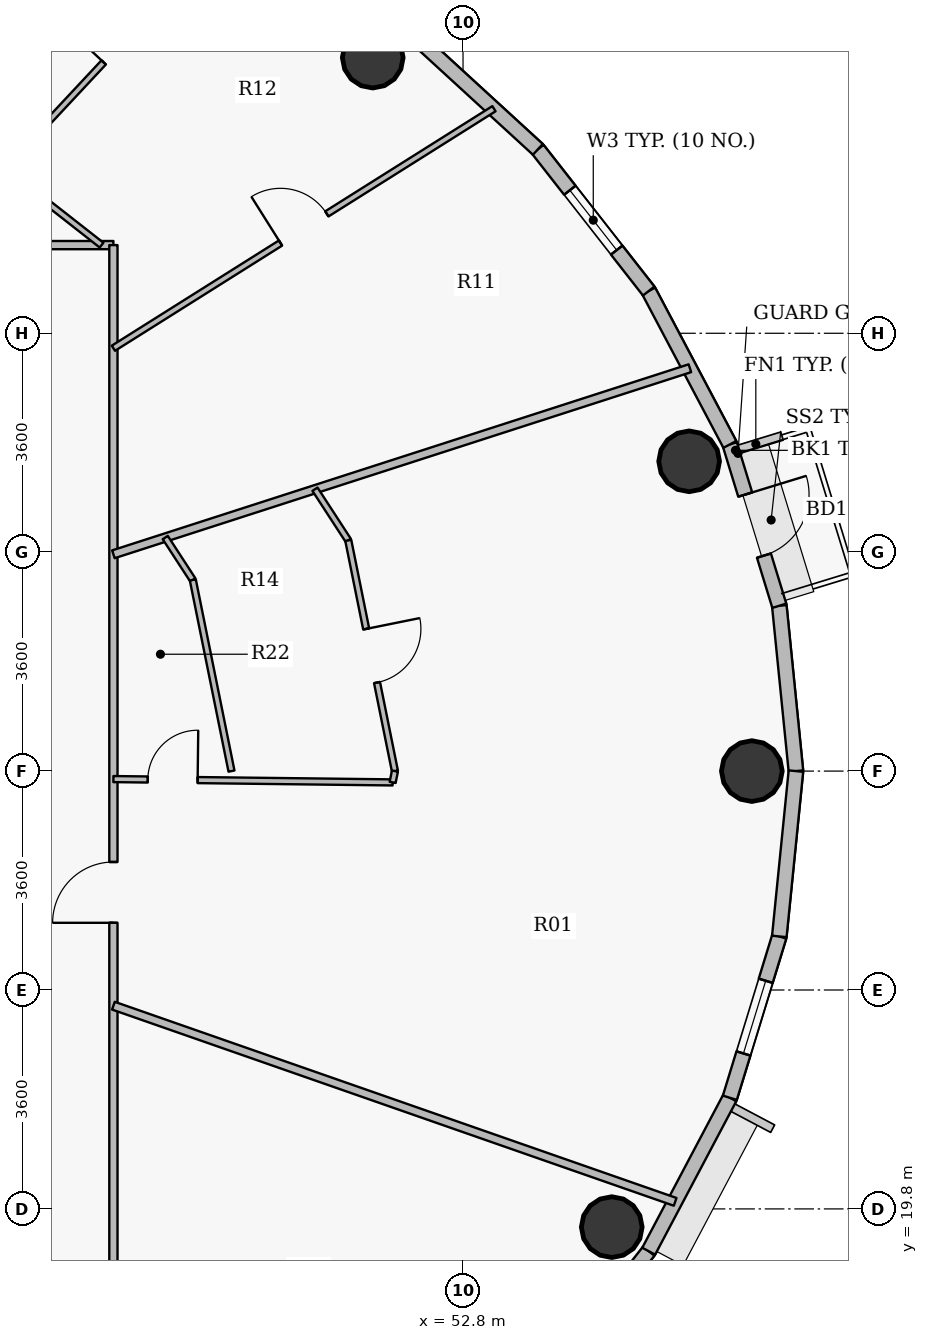
"""IFC4 building model, lengths in metres.
Left out: names, types, materials, properties, quantities, classifications, styles, units other than length and angle.
Written with IfcOpenShell. Run it as: python <this file> out.ifc"""

import sys

from ifc_helpers import new_model, si_unit, direction, frame, frame_2d, origin, origin_2d, place, context, subcontext, project, spatial, rectangle, hollow_circle, extrude, source, transform, mapped, element, fill, save


model = new_model("IFC4")
c1 = context("Model", 3, precision=1e-05, world=origin(), true_north=direction((0.0, 1.0)))
c2 = subcontext(c1, "Body", "Model", "MODEL_VIEW")
j1 = project(units=[si_unit("LENGTHUNIT", "METRE"), si_unit("PLANEANGLEUNIT", "RADIAN")], contexts=[c1])
p1 = place(None, origin())
s1 = spatial("IfcSite", under=j1, at=p1, CompositionType="ELEMENT")
p2 = place(p1, origin())
s2 = spatial("IfcBuilding", under=s1, at=p2, CompositionType="ELEMENT")
p3 = place(p2, frame((0.0, 0.0, 303.0)))
s3 = spatial("IfcBuildingStorey", under=s2, at=p3, CompositionType="ELEMENT", Elevation=303.0)
for number, where, z_axis, x_axis in (
    (1, (57.55, 27.0, 0.0), (0.0, 0.0, 1.0), (1.0, 0.0, 0.0)),
    (2, (56.519, 32.094, 0.0), (0.0, 0.0, 1.0), (1.0, 0.0, 0.0)),
    (3, (51.315, 38.733, 0.0), (0.0, 0.0, 1.0), (1.0, 0.0, 0.0)),
    (4, (55.246, 19.5, 0.0), (0.0, 0.0, 1.0), (1.0, 0.0, 0.0)),
):
    element("IfcColumn", number, at=place(p3, frame(where, z_axis=z_axis, x_axis=x_axis)), inside=s3, PredefinedType="COLUMN", context=c2, shape_type="SweptSolid", body=[
        extrude(hollow_circle(Radius=0.5, WallThickness=0.032, at=origin_2d()), origin(), (0.0, 0.0, 1.0), 3.75),
    ])
p4 = place(p3, frame((58.002, 29.719, 0.0), z_axis=(0.0, 0.0, 1.0), x_axis=(0.099972526841, -0.99499019788, 0.0)))
e5 = element("IfcWall", 5, at=p4, inside=s3, PredefinedType="SOLIDWALL", context=c2, shape_type="SweptSolid", body=[
    extrude(rectangle(XDim=2.733, YDim=0.24, at=frame_2d((1.366, 0.0))), origin(), (0.0, 0.0, 1.0), 3.5),
])
p5 = place(p3, frame((57.188, 32.372, 0.0), z_axis=(0.0, 0.0, 1.0), x_axis=(0.2931213403, -0.956075248012, 0.0)))
e6 = element("IfcWall", 6, at=p5, inside=s3, PredefinedType="SOLIDWALL", context=c2, shape_type="SweptSolid", body=[
    extrude(rectangle(XDim=2.775, YDim=0.24, at=frame_2d((1.388, 0.0))), origin(), (0.0, 0.0, 1.0), 3.5),
])
p6 = place(p5, frame((0.863, 0.0, 0.0)))
e7 = element("IfcOpeningElement", 7, at=p6, cuts=e6, PredefinedType="OPENING", context=c2, shape_type="SweptSolid", body=[
    extrude(rectangle(XDim=1.05, YDim=2.15, at=origin_2d()), frame((0.525, 0.13, 1.075), z_axis=(0.0, -1.0, 0.0), x_axis=(1.0, 0.0, 0.0)), (0.0, 0.0, 1.0), 0.26),
])
p7 = place(p3, frame((55.854, 34.895, 0.0), z_axis=(0.0, 0.0, 1.0), x_axis=(0.467628269026, -0.883925224218, 0.0)))
e8 = element("IfcWall", 8, at=p7, inside=s3, PredefinedType="SOLIDWALL", context=c2, shape_type="SweptSolid", body=[
    extrude(rectangle(XDim=2.854, YDim=0.24, at=frame_2d((1.427, 0.0))), origin(), (0.0, 0.0, 1.0), 3.5),
])
p8 = place(p3, frame((54.03, 37.225, 0.0), z_axis=(0.0, 0.0, 1.0), x_axis=(0.616337186556, -0.787482363275, 0.0)))
e9 = element("IfcWall", 9, at=p8, inside=s3, PredefinedType="SOLIDWALL", context=c2, shape_type="SweptSolid", body=[
    extrude(rectangle(XDim=2.958, YDim=0.24, at=frame_2d((1.479, 0.0))), origin(), (0.0, 0.0, 1.0), 3.5),
])
p9 = place(p8, frame((0.854, 0.0, 0.9)))
e10 = element("IfcOpeningElement", 10, at=p9, cuts=e9, PredefinedType="OPENING", context=c2, shape_type="SweptSolid", body=[
    extrude(rectangle(XDim=1.25, YDim=1.65, at=origin_2d()), frame((0.625, 0.13, 0.825), z_axis=(0.0, -1.0, 0.0), x_axis=(1.0, 0.0, 0.0)), (0.0, 0.0, 1.0), 0.26),
])
p10 = place(p3, frame((51.762, 39.304, 0.0), z_axis=(0.0, 0.0, 1.0), x_axis=(0.737068506972, -0.675818034703, 0.0)))
e11 = element("IfcWall", 11, at=p10, inside=s3, PredefinedType="SOLIDWALL", context=c2, shape_type="SweptSolid", body=[
    extrude(rectangle(XDim=3.077, YDim=0.24, at=frame_2d((1.539, 0.0))), origin(), (0.0, 0.0, 1.0), 3.5),
])
p11 = place(p3, frame((55.854, 19.105, 0.0), z_axis=(0.0, 0.0, 1.0), x_axis=(-0.616337186556, -0.787482363275, 0.0)))
e12 = element("IfcWall", 12, at=p11, inside=s3, PredefinedType="SOLIDWALL", context=c2, shape_type="SweptSolid", body=[
    extrude(rectangle(XDim=2.958, YDim=0.24, at=frame_2d((1.479, 0.0))), origin(), (0.0, 0.0, 1.0), 3.5),
])
p12 = place(p11, frame((0.854, 0.0, 0.9)))
e13 = element("IfcOpeningElement", 13, at=p12, cuts=e12, PredefinedType="OPENING", context=c2, shape_type="SweptSolid", body=[
    extrude(rectangle(XDim=1.25, YDim=1.65, at=origin_2d()), frame((0.625, 0.13, 0.825), z_axis=(0.0, -1.0, 0.0), x_axis=(1.0, 0.0, 0.0)), (0.0, 0.0, 1.0), 0.26),
])
p13 = place(p3, frame((57.188, 21.628, 0.0), z_axis=(0.0, 0.0, 1.0), x_axis=(-0.467628269026, -0.883925224218, 0.0)))
e14 = element("IfcWall", 14, at=p13, inside=s3, PredefinedType="SOLIDWALL", context=c2, shape_type="SweptSolid", body=[
    extrude(rectangle(XDim=2.854, YDim=0.24, at=frame_2d((1.427, 0.0))), origin(), (0.0, 0.0, 1.0), 3.5),
])
p14 = place(p3, frame((58.002, 24.281, 0.0), z_axis=(0.0, 0.0, 1.0), x_axis=(-0.2931213403, -0.956075248012, 0.0)))
e15 = element("IfcWall", 15, at=p14, inside=s3, PredefinedType="SOLIDWALL", context=c2, shape_type="SweptSolid", body=[
    extrude(rectangle(XDim=2.775, YDim=0.24, at=frame_2d((1.388, 0.0))), origin(), (0.0, 0.0, 1.0), 3.5),
])
p15 = place(p14, frame((0.763, 0.0, 0.9)))
e16 = element("IfcOpeningElement", 16, at=p15, cuts=e15, PredefinedType="OPENING", context=c2, shape_type="SweptSolid", body=[
    extrude(rectangle(XDim=1.25, YDim=1.65, at=origin_2d()), frame((0.625, 0.13, 0.825), z_axis=(0.0, -1.0, 0.0), x_axis=(1.0, 0.0, 0.0)), (0.0, 0.0, 1.0), 0.26),
])
p16 = place(p3, frame((58.275, 27.0, 0.0), z_axis=(0.0, 0.0, 1.0), x_axis=(-0.099972526841, -0.99499019788, 0.0)))
e17 = element("IfcWall", 17, at=p16, inside=s3, PredefinedType="SOLIDWALL", context=c2, shape_type="SweptSolid", body=[
    extrude(rectangle(XDim=2.733, YDim=0.24, at=frame_2d((1.366, 0.0))), origin(), (0.0, 0.0, 1.0), 3.5),
])
p17 = place(p3, frame((36.95, 35.65, 0.0), z_axis=(0.0, 0.0, 1.0), x_axis=(1.0, 0.0, 0.0)))
e18 = element("IfcWall", 18, at=p17, inside=s3, PredefinedType="PARTITIONING", context=c2, shape_type="SweptSolid", body=[
    extrude(rectangle(XDim=10.1, YDim=0.135, at=frame_2d((5.05, 0.0))), origin(), (0.0, 0.0, 1.0), 3.035),
])
p18 = place(p17, frame((6.477, 0.0, 0.0)))
e19 = element("IfcOpeningElement", 19, at=p18, cuts=e18, PredefinedType="OPENING", context=c2, shape_type="SweptSolid", body=[
    extrude(rectangle(XDim=1.0, YDim=2.15, at=origin_2d()), frame((0.5, 0.078, 1.075), z_axis=(0.0, -1.0, 0.0), x_axis=(1.0, 0.0, 0.0)), (0.0, 0.0, 1.0), 0.155),
])
p19 = place(p3, frame((45.254, 36.904, 0.0), z_axis=(0.0, 0.0, 1.0), x_axis=(0.787350433025, -0.616505714179, 0.0)))
e20 = element("IfcWall", 20, at=p19, inside=s3, PredefinedType="PARTITIONING", context=c2, shape_type="SweptSolid", body=[
    extrude(rectangle(XDim=2.033, YDim=0.1, at=frame_2d((1.017, 0.0))), origin(), (0.0, 0.0, 1.0), 3.5),
])
p20 = place(p3, frame((45.254, 36.904, 0.0), z_axis=(0.0, 0.0, 1.0), x_axis=(0.682727638106, 0.73067295842, 0.0)))
e21 = element("IfcWall", 21, at=p20, inside=s3, PredefinedType="PARTITIONING", context=c2, shape_type="SweptSolid", body=[
    extrude(rectangle(XDim=5.693, YDim=0.1, at=frame_2d((2.846, 0.0))), origin(), (0.0, 0.0, 1.0), 2.985),
])
p21 = place(p20, frame((2.396, 0.0, 0.0)))
e22 = element("IfcOpeningElement", 22, at=p21, cuts=e21, PredefinedType="OPENING", context=c2, shape_type="SweptSolid", body=[
    extrude(rectangle(XDim=0.9, YDim=2.1, at=origin_2d()), frame((0.45, 0.06, 1.05), z_axis=(0.0, -1.0, 0.0), x_axis=(1.0, 0.0, 0.0)), (0.0, 0.0, 1.0), 0.12),
])
p22 = place(p3, frame((47.05, 18.35, 0.0), z_axis=(0.0, 0.0, 1.0), x_axis=(0.0, 1.0, 0.0)))
e23 = element("IfcWall", 23, at=p22, inside=s3, PredefinedType="PARTITIONING", context=c2, shape_type="SweptSolid", body=[
    extrude(rectangle(XDim=17.3, YDim=0.135, at=frame_2d((8.65, 0.0))), origin(), (0.0, 0.0, 1.0), 3.035),
])
p23 = place(p22, frame((6.155, 0.0, 0.0)))
e24 = element("IfcOpeningElement", 24, at=p23, cuts=e23, PredefinedType="OPENING", context=c2, shape_type="SweptSolid", body=[
    extrude(rectangle(XDim=1.0, YDim=2.15, at=origin_2d()), frame((0.5, 0.078, 1.075), z_axis=(0.0, -1.0, 0.0), x_axis=(1.0, 0.0, 0.0)), (0.0, 0.0, 1.0), 0.155),
])
p24 = place(p3, frame((47.05, 23.142, 0.0), z_axis=(0.0, 0.0, 1.0), x_axis=(0.94410974345, -0.329631297547, 0.0)))
e25 = element("IfcWall", 25, at=p24, inside=s3, PredefinedType="PARTITIONING", context=c2, shape_type="SweptSolid", body=[
    extrude(rectangle(XDim=9.785, YDim=0.135, at=frame_2d((4.893, 0.0))), origin(), (0.0, 0.0, 1.0), 2.985),
])
p25 = place(p3, frame((47.05, 26.869, 0.0), z_axis=(0.0, 0.0, 1.0), x_axis=(0.999929100649, -0.011907714968, 0.0)))
e26 = element("IfcWall", 26, at=p25, inside=s3, PredefinedType="PARTITIONING", context=c2, shape_type="SweptSolid", body=[
    extrude(rectangle(XDim=4.593, YDim=0.1, at=frame_2d((2.296, 0.0))), origin(), (0.0, 0.0, 1.0), 3.035),
])
p26 = place(p25, frame((0.565, 0.0, 0.0)))
e27 = element("IfcOpeningElement", 27, at=p26, cuts=e26, PredefinedType="OPENING", context=c2, shape_type="SweptSolid", body=[
    extrude(rectangle(XDim=0.82, YDim=2.1, at=origin_2d()), frame((0.41, 0.06, 1.05), z_axis=(0.0, -1.0, 0.0), x_axis=(1.0, 0.0, 0.0)), (0.0, 0.0, 1.0), 0.12),
])
p27 = place(p3, frame((47.05, 30.565, 0.0), z_axis=(0.0, 0.0, 1.0), x_axis=(0.951682976888, 0.307082255269, 0.0)))
e28 = element("IfcWall", 28, at=p27, inside=s3, PredefinedType="PARTITIONING", context=c2, shape_type="SweptSolid", body=[
    extrude(rectangle(XDim=9.963, YDim=0.135, at=frame_2d((4.981, 0.0))), origin(), (0.0, 0.0, 1.0), 2.985),
])
p28 = place(p3, frame((47.05, 33.954, 0.0), z_axis=(0.0, 0.0, 1.0), x_axis=(0.846339777122, 0.532643390704, 0.0)))
e29 = element("IfcWall", 29, at=p28, inside=s3, PredefinedType="PARTITIONING", context=c2, shape_type="SweptSolid", body=[
    extrude(rectangle(XDim=7.395, YDim=0.1, at=frame_2d((3.698, 0.0))), origin(), (0.0, 0.0, 1.0), 2.985),
])
p29 = place(p28, frame((3.248, 0.0, 0.0)))
e30 = element("IfcOpeningElement", 30, at=p29, cuts=e29, PredefinedType="OPENING", context=c2, shape_type="SweptSolid", body=[
    extrude(rectangle(XDim=0.9, YDim=2.1, at=origin_2d()), frame((0.45, 0.06, 1.05), z_axis=(0.0, -1.0, 0.0), x_axis=(1.0, 0.0, 0.0)), (0.0, 0.0, 1.0), 0.12),
])
p30 = place(p3, frame((47.903, 30.841, 0.0), z_axis=(0.0, 0.0, 1.0), x_axis=(0.545586849168, -0.838054288227, 0.0)))
e31 = element("IfcWall", 31, at=p30, inside=s3, PredefinedType="PARTITIONING", context=c2, shape_type="SweptSolid", body=[
    extrude(rectangle(XDim=0.832, YDim=0.1, at=frame_2d((0.416, 0.0))), origin(), (0.0, 0.0, 1.0), 3.035),
])
p31 = place(p3, frame((48.356, 30.144, 0.0), z_axis=(0.0, 0.0, 1.0), x_axis=(0.198208908342, -0.98015979751, 0.0)))
e32 = element("IfcWall", 32, at=p31, inside=s3, PredefinedType="PARTITIONING", context=c2, shape_type="SweptSolid", body=[
    extrude(rectangle(XDim=3.208, YDim=0.1, at=frame_2d((1.604, 0.0))), origin(), (0.0, 0.0, 1.0), 3.035),
])
p32 = place(p3, frame((50.365, 31.635, 0.0), z_axis=(0.0, 0.0, 1.0), x_axis=(0.545458599095, -0.83813776712, 0.0)))
e33 = element("IfcWall", 33, at=p32, inside=s3, PredefinedType="PARTITIONING", context=c2, shape_type="SweptSolid", body=[
    extrude(rectangle(XDim=1.003, YDim=0.1, at=frame_2d((0.502, 0.0))), origin(), (0.0, 0.0, 1.0), 3.035),
])
p33 = place(p3, frame((50.913, 30.794, 0.0), z_axis=(0.0, 0.0, 1.0), x_axis=(0.198226068862, -0.980156327135, 0.0)))
e34 = element("IfcWall", 34, at=p33, inside=s3, PredefinedType="PARTITIONING", context=c2, shape_type="SweptSolid", body=[
    extrude(rectangle(XDim=3.871, YDim=0.1, at=frame_2d((1.936, 0.0))), origin(), (0.0, 0.0, 1.0), 3.035),
])
p34 = place(p33, frame((1.486, 0.0, 0.0)))
e35 = element("IfcOpeningElement", 35, at=p34, cuts=e34, PredefinedType="OPENING", context=c2, shape_type="SweptSolid", body=[
    extrude(rectangle(XDim=0.9, YDim=2.1, at=origin_2d()), frame((0.45, 0.06, 1.05), z_axis=(0.0, -1.0, 0.0), x_axis=(1.0, 0.0, 0.0)), (0.0, 0.0, 1.0), 0.12),
])
p35 = place(p3, frame((51.642, 26.814, 0.0), z_axis=(0.0, 0.0, 1.0), x_axis=(0.198094703821, 0.980182885138, 0.0)))
e36 = element("IfcWall", 36, at=p35, inside=s3, PredefinedType="PARTITIONING", context=c2, shape_type="SweptSolid", body=[
    extrude(rectangle(XDim=0.19, YDim=0.1, at=frame_2d((0.095, 0.0))), origin(), (0.0, 0.0, 1.0), 3.035),
])
m1 = source(origin(), c2, "Body", "SweptSolid", [
    extrude(rectangle(XDim=1.05, YDim=2.15, at=origin_2d()), frame((0.525, 0.025, 1.075), z_axis=(0.0, -1.0, 0.0), x_axis=(1.0, 0.0, 0.0)), (0.0, 0.0, 1.0), 0.05),
])
p36 = place(p6, origin())
e37 = element("IfcDoor", 37, at=p36, inside=s3, OperationType="SINGLE_SWING_LEFT", PredefinedType="DOOR", context=c2, shape_type="MappedRepresentation", body=[
    mapped(m1, transform((0.0, 0.0, 0.0), x_axis=(1.0, 0.0, 0.0), y_axis=(0.0, 1.0, 0.0), z_axis=(0.0, 0.0, 1.0), scale=1.0)),
])
fill(e7, e37)
m2 = source(origin(), c2, "Body", "SweptSolid", [
    extrude(rectangle(XDim=1.25, YDim=1.65, at=origin_2d()), frame((0.625, 0.03, 0.825), z_axis=(0.0, -1.0, 0.0), x_axis=(1.0, 0.0, 0.0)), (0.0, 0.0, 1.0), 0.06),
])
p37 = place(p9, origin())
e38 = element("IfcWindow", 38, at=p37, inside=s3, PartitioningType="SINGLE_PANEL", PredefinedType="WINDOW", context=c2, shape_type="MappedRepresentation", body=[
    mapped(m2, transform((0.0, 0.0, 0.0), x_axis=(1.0, 0.0, 0.0), y_axis=(0.0, 1.0, 0.0), z_axis=(0.0, 0.0, 1.0), scale=1.0)),
])
fill(e10, e38)
p38 = place(p15, origin())
e39 = element("IfcWindow", 39, at=p38, inside=s3, PartitioningType="SINGLE_PANEL", PredefinedType="WINDOW", context=c2, shape_type="MappedRepresentation", body=[
    mapped(m2, transform((0.0, 0.0, 0.0), x_axis=(1.0, 0.0, 0.0), y_axis=(0.0, 1.0, 0.0), z_axis=(0.0, 0.0, 1.0), scale=1.0)),
])
fill(e16, e39)
m3 = source(origin(), c2, "Body", "SweptSolid", [
    extrude(rectangle(XDim=1.0, YDim=2.15, at=origin_2d()), frame((0.5, 0.025, 1.075), z_axis=(0.0, -1.0, 0.0), x_axis=(1.0, 0.0, 0.0)), (0.0, 0.0, 1.0), 0.05),
])
p39 = place(p23, origin())
e40 = element("IfcDoor", 40, at=p39, inside=s3, OperationType="SINGLE_SWING_LEFT", PredefinedType="DOOR", context=c2, shape_type="MappedRepresentation", body=[
    mapped(m3, transform((0.0, 0.0, 0.0), x_axis=(1.0, 0.0, 0.0), y_axis=(0.0, 1.0, 0.0), z_axis=(0.0, 0.0, 1.0), scale=1.0)),
])
fill(e24, e40)
m4 = source(origin(), c2, "Body", "SweptSolid", [
    extrude(rectangle(XDim=0.82, YDim=2.1, at=origin_2d()), frame((0.41, 0.025, 1.05), z_axis=(0.0, -1.0, 0.0), x_axis=(1.0, 0.0, 0.0)), (0.0, 0.0, 1.0), 0.05),
])
p40 = place(p26, origin())
e41 = element("IfcDoor", 41, at=p40, inside=s3, OperationType="SINGLE_SWING_RIGHT", PredefinedType="DOOR", context=c2, shape_type="MappedRepresentation", body=[
    mapped(m4, transform((0.0, 0.0, 0.0), x_axis=(1.0, 0.0, 0.0), y_axis=(0.0, 1.0, 0.0), z_axis=(0.0, 0.0, 1.0), scale=1.0)),
])
fill(e27, e41)
m5 = source(origin(), c2, "Body", "SweptSolid", [
    extrude(rectangle(XDim=0.9, YDim=2.1, at=origin_2d()), frame((0.45, 0.025, 1.05), z_axis=(0.0, -1.0, 0.0), x_axis=(1.0, 0.0, 0.0)), (0.0, 0.0, 1.0), 0.05),
])
p41 = place(p34, origin())
e42 = element("IfcDoor", 42, at=p41, inside=s3, OperationType="SINGLE_SWING_LEFT", PredefinedType="DOOR", context=c2, shape_type="MappedRepresentation", body=[
    mapped(m5, transform((0.0, 0.0, 0.0), x_axis=(1.0, 0.0, 0.0), y_axis=(0.0, 1.0, 0.0), z_axis=(0.0, 0.0, 1.0), scale=1.0)),
])
fill(e35, e42)
p42 = place(p21, origin())
e43 = element("IfcDoor", 43, at=p42, inside=s3, OperationType="SINGLE_SWING_LEFT", PredefinedType="DOOR", context=c2, shape_type="MappedRepresentation", body=[
    mapped(m5, transform((0.0, 0.0, 0.0), x_axis=(1.0, 0.0, 0.0), y_axis=(0.0, 1.0, 0.0), z_axis=(0.0, 0.0, 1.0), scale=1.0)),
])
fill(e22, e43)
p43 = place(p29, origin())
e44 = element("IfcDoor", 44, at=p43, inside=s3, OperationType="SINGLE_SWING_LEFT", PredefinedType="DOOR", context=c2, shape_type="MappedRepresentation", body=[
    mapped(m5, transform((0.0, 0.0, 0.0), x_axis=(1.0, 0.0, 0.0), y_axis=(0.0, 1.0, 0.0), z_axis=(0.0, 0.0, 1.0), scale=1.0)),
])
fill(e30, e44)
save(model, sys.argv[1])
